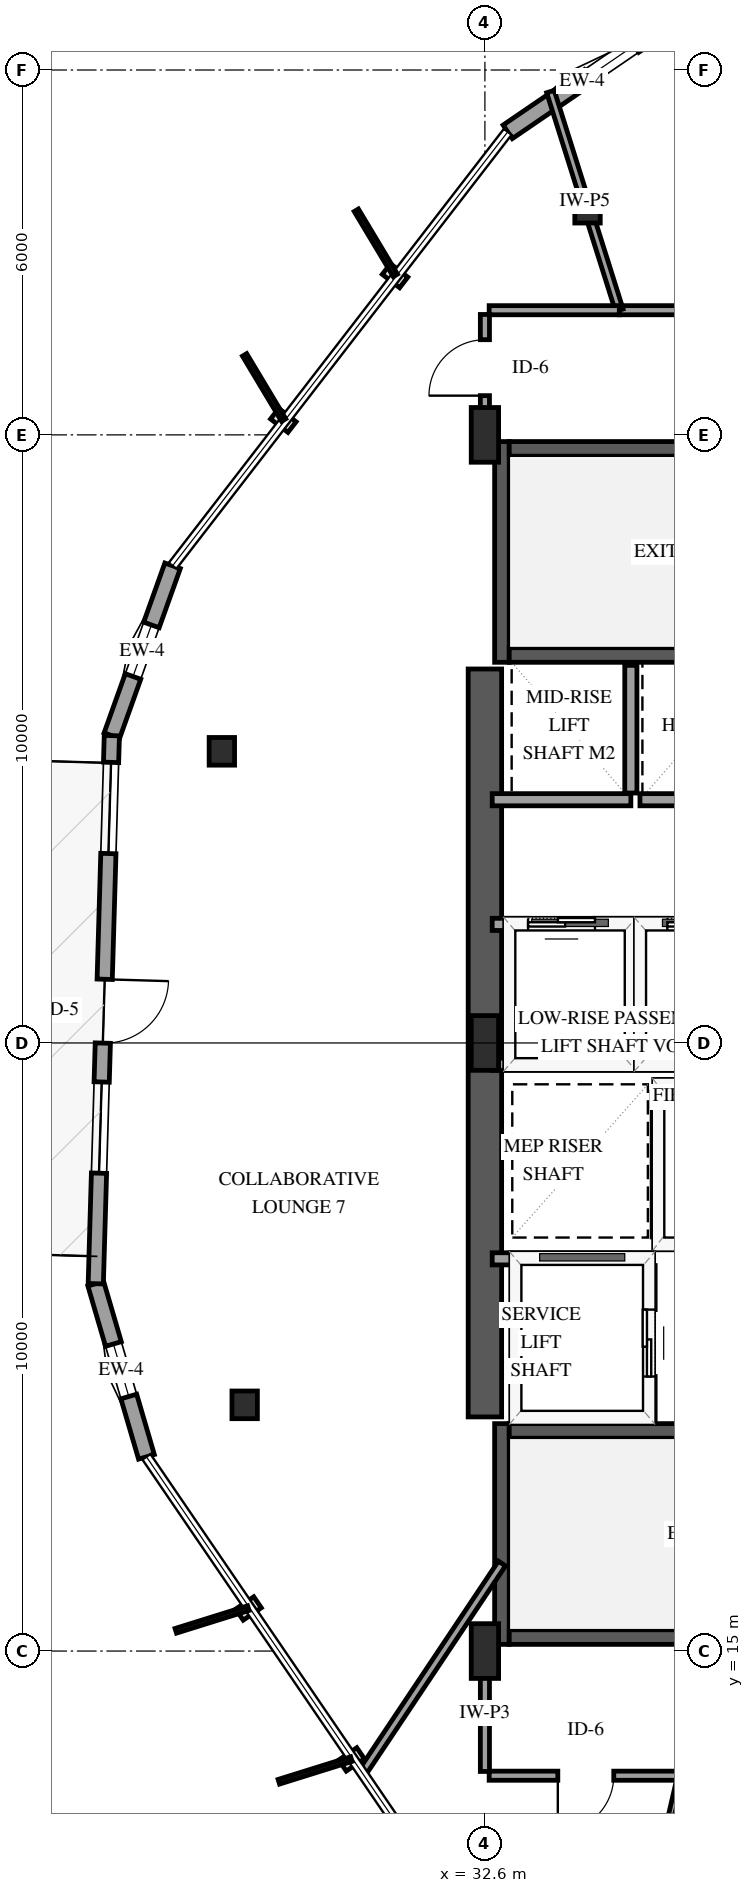
"""IFC4 building model, lengths in metres.
Left out: names, types, materials, properties, quantities, classifications, styles, units other than length and angle.
Written with IfcOpenShell. Run it as: python <this file> out.ifc"""

import sys

from ifc_helpers import new_model, si_unit, direction, frame, frame_2d, origin, origin_2d, place, context, subcontext, project, spatial, rectangle, i_section, extrude, element, fill, save


model = new_model("IFC4")
c1 = context("Model", 3, precision=1e-05, world=origin(), true_north=direction((0.0, 1.0)))
c2 = subcontext(c1, "Body", "Model", "MODEL_VIEW")
j1 = project(units=[si_unit("LENGTHUNIT", "METRE"), si_unit("PLANEANGLEUNIT", "RADIAN")], contexts=[c1])
p1 = place(None, origin())
s1 = spatial("IfcSite", under=j1, at=p1, CompositionType="ELEMENT")
p2 = place(p1, origin())
s2 = spatial("IfcBuilding", under=s1, at=p2, CompositionType="ELEMENT")
p3 = place(p2, frame((0.0, 0.0, 91.3)))
s3 = spatial("IfcBuildingStorey", under=s2, at=p3, CompositionType="ELEMENT", Elevation=91.3)
p4 = place(p3, frame((32.88, 15.11, 0.0), z_axis=(0.0, 0.0, 1.0), x_axis=(0.0, 1.0, 0.0)))
e1 = element("IfcWall", 1, at=p4, inside=s3, PredefinedType="SHEAR", context=c2, shape_type="SweptSolid", body=[
    extrude(rectangle(XDim=3.63, YDim=0.24, at=frame_2d((1.815, 0.0))), origin(), (0.0, 0.0, 1.0), 3.9),
])
for number, where, z_axis, x_axis in (
    (2, (33.0, 15.23, 0.0), (0.0, 0.0, 1.0), (1.0, 0.0, 0.0)),
    (3, (33.0, 18.62, 0.0), (0.0, 0.0, 1.0), (1.0, 0.0, 0.0)),
):
    element("IfcWall", number, at=place(p3, frame(where, z_axis=z_axis, x_axis=x_axis)), inside=s3, PredefinedType="SHEAR", context=c2, shape_type="SweptSolid", body=[
        extrude(rectangle(XDim=8.0, YDim=0.24, at=frame_2d((4.0, 0.0))), origin(), (0.0, 0.0, 1.0), 3.9),
    ])
p5 = place(p3, frame((32.88, 31.26, 0.0), z_axis=(0.0, 0.0, 1.0), x_axis=(0.0, 1.0, 0.0)))
e4 = element("IfcWall", 4, at=p5, inside=s3, PredefinedType="SHEAR", context=c2, shape_type="SweptSolid", body=[
    extrude(rectangle(XDim=3.63, YDim=0.24, at=frame_2d((1.815, 0.0))), origin(), (0.0, 0.0, 1.0), 3.9),
])
for number, where, z_axis, x_axis in (
    (5, (33.0, 31.38, 0.0), (0.0, 0.0, 1.0), (1.0, 0.0, 0.0)),
    (6, (33.0, 34.77, 0.0), (0.0, 0.0, 1.0), (1.0, 0.0, 0.0)),
):
    element("IfcWall", number, at=place(p3, frame(where, z_axis=z_axis, x_axis=x_axis)), inside=s3, PredefinedType="SHEAR", context=c2, shape_type="SweptSolid", body=[
        extrude(rectangle(XDim=8.0, YDim=0.24, at=frame_2d((4.0, 0.0))), origin(), (0.0, 0.0, 1.0), 3.9),
    ])
p6 = place(p3, frame((32.6, 18.85, 0.0), z_axis=(0.0, 0.0, 1.0), x_axis=(0.0, 1.0, 0.0)))
e7 = element("IfcWall", 7, at=p6, inside=s3, PredefinedType="SHEAR", context=c2, shape_type="SweptSolid", body=[
    extrude(rectangle(XDim=12.3, YDim=0.55, at=frame_2d((6.15, 0.0))), origin(), (0.0, 0.0, 1.0), 3.9),
])
for number, where, z_axis, x_axis in (
    (8, (32.6, 15.0, 0.0), (0.0, 0.0, 1.0), (1.0, 0.0, 0.0)),
    (9, (32.6, 25.0, 0.0), (0.0, 0.0, 1.0), (1.0, 0.0, 0.0)),
    (10, (32.6, 35.0, 0.0), (0.0, 0.0, 1.0), (1.0, 0.0, 0.0)),
):
    element("IfcColumn", number, at=place(p3, frame(where, z_axis=z_axis, x_axis=x_axis)), inside=s3, PredefinedType="PILASTER", context=c2, shape_type="SweptSolid", body=[
        extrude(rectangle(XDim=0.45, YDim=0.9, at=origin_2d()), origin(), (0.0, 0.0, 1.0), 3.9),
    ])
for number, where, z_axis, x_axis in (
    (11, (34.288, 38.711, 0.0), (0.0, 0.0, 1.0), (1.0, 0.0, 0.0)),
    (12, (28.274, 29.796, 0.0), (0.0, 0.0, 1.0), (1.0, 0.0, 0.0)),
    (13, (28.649, 19.049, 0.0), (0.0, 0.0, 1.0), (1.0, 0.0, 0.0)),
):
    element("IfcColumn", number, at=place(p3, frame(where, z_axis=z_axis, x_axis=x_axis)), inside=s3, PredefinedType="COLUMN", context=c2, shape_type="SweptSolid", body=[
        extrude(i_section(OverallWidth=0.418, OverallDepth=0.455, WebThickness=0.042, FlangeThickness=0.068, FilletRadius=0.038, at=origin_2d()), origin(), (0.0, 0.0, 1.0), 3.9),
    ])
p7 = place(p3, frame((35.425, 41.656, 0.0), z_axis=(0.0, 0.0, 1.0), x_axis=(-0.825884174717, -0.563839808768, 0.0)))
e14 = element("IfcWall", 14, at=p7, inside=s3, PredefinedType="SOLIDWALL", context=c2, shape_type="SweptSolid", body=[
    extrude(rectangle(XDim=2.967, YDim=0.27, at=frame_2d((1.483, 0.0))), origin(), (0.0, 0.0, 1.0), 2.979),
])
p8 = place(p7, frame((0.45, 0.0, 0.75)))
e15 = element("IfcOpeningElement", 15, at=p8, cuts=e14, PredefinedType="OPENING", context=c2, shape_type="SweptSolid", body=[
    extrude(rectangle(XDim=0.9, YDim=1.5, at=frame_2d((0.45, 0.75))), frame((0.0, 0.145, 0.0), z_axis=(0.0, -1.0, 0.0), x_axis=(1.0, 0.0, 0.0)), (0.0, 0.0, 1.0), 0.29),
])
p9 = place(p3, frame((27.464, 32.847, 0.0), z_axis=(0.0, 0.0, 1.0), x_axis=(-0.336742989922, -0.941596600853, 0.0)))
e16 = element("IfcWall", 16, at=p9, inside=s3, PredefinedType="SOLIDWALL", context=c2, shape_type="SweptSolid", body=[
    extrude(rectangle(XDim=2.967, YDim=0.27, at=frame_2d((1.483, 0.0))), origin(), (0.0, 0.0, 1.0), 2.979),
])
p10 = place(p9, frame((1.033, 0.0, 0.75)))
e17 = element("IfcOpeningElement", 17, at=p10, cuts=e16, PredefinedType="OPENING", context=c2, shape_type="SweptSolid", body=[
    extrude(rectangle(XDim=0.9, YDim=1.5, at=frame_2d((0.45, 0.75))), frame((0.0, 0.145, 0.0), z_axis=(0.0, -1.0, 0.0), x_axis=(1.0, 0.0, 0.0)), (0.0, 0.0, 1.0), 0.29),
])
p11 = place(p3, frame((26.2, 21.041, 0.0), z_axis=(0.0, 0.0, 1.0), x_axis=(0.280976408638, -0.959714675197, 0.0)))
e18 = element("IfcWall", 18, at=p11, inside=s3, PredefinedType="SOLIDWALL", context=c2, shape_type="SweptSolid", body=[
    extrude(rectangle(XDim=2.966, YDim=0.27, at=frame_2d((1.483, 0.0))), origin(), (0.0, 0.0, 1.0), 2.979),
])
p12 = place(p11, frame((1.033, 0.0, 0.75)))
e19 = element("IfcOpeningElement", 19, at=p12, cuts=e18, PredefinedType="OPENING", context=c2, shape_type="SweptSolid", body=[
    extrude(rectangle(XDim=0.9, YDim=1.5, at=frame_2d((0.45, 0.75))), frame((0.0, 0.145, 0.0), z_axis=(0.0, -1.0, 0.0), x_axis=(1.0, 0.0, 0.0)), (0.0, 0.0, 1.0), 0.29),
])
p13 = place(p3, frame((26.465, 30.054, 0.0), z_axis=(0.0, 0.0, 1.0), x_axis=(-0.029323462977, -0.999569974799, 0.0)))
e20 = element("IfcWall", 20, at=p13, inside=s3, PredefinedType="SOLIDWALL", context=c2, shape_type="SweptSolid", body=[
    extrude(rectangle(XDim=9.017, YDim=0.25, at=frame_2d((4.508, 0.0))), origin(), (0.0, 0.0, 1.0), 2.979),
])
p14 = place(p13, frame((4.008, 0.0, 0.0)))
e21 = element("IfcOpeningElement", 21, at=p14, cuts=e20, PredefinedType="OPENING", context=c2, shape_type="SweptSolid", body=[
    extrude(rectangle(XDim=1.05, YDim=2.15, at=frame_2d((0.525, 1.075))), frame((0.0, 0.135, 0.0), z_axis=(0.0, -1.0, 0.0), x_axis=(1.0, 0.0, 0.0)), (0.0, 0.0, 1.0), 0.27),
])
p15 = place(p13, frame((0.44, 0.0, 0.72)))
e22 = element("IfcOpeningElement", 22, at=p15, cuts=e20, PredefinedType="OPENING", context=c2, shape_type="SweptSolid", body=[
    extrude(rectangle(XDim=1.5, YDim=1.7, at=frame_2d((0.75, 0.85))), frame((0.0, 0.135, 0.0), z_axis=(0.0, -1.0, 0.0), x_axis=(1.0, 0.0, 0.0)), (0.0, 0.0, 1.0), 0.27),
])
p16 = place(p13, frame((5.698, 0.0, 0.72)))
e23 = element("IfcOpeningElement", 23, at=p16, cuts=e20, PredefinedType="OPENING", context=c2, shape_type="SweptSolid", body=[
    extrude(rectangle(XDim=1.5, YDim=1.7, at=frame_2d((0.75, 0.85))), frame((0.0, 0.135, 0.0), z_axis=(0.0, -1.0, 0.0), x_axis=(1.0, 0.0, 0.0)), (0.0, 0.0, 1.0), 0.27),
])
p17 = place(p3, frame((35.45, 21.7, 0.0), z_axis=(0.0, 0.0, 1.0), x_axis=(1.0, 0.0, 0.0)))
e24 = element("IfcWall", 24, at=p17, inside=s3, PredefinedType="SOLIDWALL", context=c2, shape_type="SweptSolid", body=[
    extrude(rectangle(XDim=2.0, YDim=0.2, at=frame_2d((1.0, 0.0))), origin(), (0.0, 0.0, 1.0), 3.6),
])
p18 = place(p17, frame((0.45, 0.0, 0.0)))
e25 = element("IfcOpeningElement", 25, at=p18, cuts=e24, PredefinedType="OPENING", context=c2, shape_type="SweptSolid", body=[
    extrude(rectangle(XDim=1.1, YDim=2.15, at=frame_2d((0.55, 1.075))), frame((0.0, 0.11, 0.0), z_axis=(0.0, -1.0, 0.0), x_axis=(1.0, 0.0, 0.0)), (0.0, 0.0, 1.0), 0.22),
])
p19 = place(p3, frame((35.45, 24.3, 0.0), z_axis=(0.0, 0.0, 1.0), x_axis=(1.0, 0.0, 0.0)))
e26 = element("IfcWall", 26, at=p19, inside=s3, PredefinedType="SOLIDWALL", context=c2, shape_type="SweptSolid", body=[
    extrude(rectangle(XDim=2.0, YDim=0.2, at=frame_2d((1.0, 0.0))), origin(), (0.0, 0.0, 1.0), 3.6),
])
p20 = place(p3, frame((35.45, 21.81, 0.0), z_axis=(0.0, 0.0, 1.0), x_axis=(0.0, 1.0, 0.0)))
e27 = element("IfcWall", 27, at=p20, inside=s3, PredefinedType="SOLIDWALL", context=c2, shape_type="SweptSolid", body=[
    extrude(rectangle(XDim=2.38, YDim=0.2, at=frame_2d((1.19, 0.0))), origin(), (0.0, 0.0, 1.0), 3.6),
])
p21 = place(p3, frame((32.72, 21.45, 0.0), z_axis=(0.0, 0.0, 1.0), x_axis=(1.0, 0.0, 0.0)))
e28 = element("IfcWall", 28, at=p21, inside=s3, PredefinedType="SOLIDWALL", context=c2, shape_type="SweptSolid", body=[
    extrude(rectangle(XDim=2.58, YDim=0.2, at=frame_2d((1.29, 0.0))), origin(), (0.0, 0.0, 1.0), 3.6),
])
p22 = place(p3, frame((35.3, 18.79, 0.0), z_axis=(0.0, 0.0, 1.0), x_axis=(0.0, 1.0, 0.0)))
e29 = element("IfcWall", 29, at=p22, inside=s3, PredefinedType="SOLIDWALL", context=c2, shape_type="SweptSolid", body=[
    extrude(rectangle(XDim=2.55, YDim=0.2, at=frame_2d((1.275, 0.0))), origin(), (0.0, 0.0, 1.0), 3.6),
])
p23 = place(p22, frame((0.725, 0.0, 0.0)))
e30 = element("IfcOpeningElement", 30, at=p23, cuts=e29, PredefinedType="OPENING", context=c2, shape_type="SweptSolid", body=[
    extrude(rectangle(XDim=1.1, YDim=2.15, at=frame_2d((0.55, 1.075))), frame((0.0, 0.11, 0.0), z_axis=(0.0, -1.0, 0.0), x_axis=(1.0, 0.0, 0.0)), (0.0, 0.0, 1.0), 0.22),
])
p24 = place(p3, frame((32.72, 24.65, 0.0), z_axis=(0.0, 0.0, 1.0), x_axis=(1.0, 0.0, 0.0)))
e31 = element("IfcWall", 31, at=p24, inside=s3, PredefinedType="SOLIDWALL", context=c2, shape_type="SweptSolid", body=[
    extrude(rectangle(XDim=2.28, YDim=0.2, at=frame_2d((1.14, 0.0))), origin(), (0.0, 0.0, 1.0), 3.6),
])
p25 = place(p3, frame((32.72, 26.95, 0.0), z_axis=(0.0, 0.0, 1.0), x_axis=(1.0, 0.0, 0.0)))
e32 = element("IfcWall", 32, at=p25, inside=s3, PredefinedType="SOLIDWALL", context=c2, shape_type="SweptSolid", body=[
    extrude(rectangle(XDim=2.28, YDim=0.2, at=frame_2d((1.14, 0.0))), origin(), (0.0, 0.0, 1.0), 3.6),
])
p26 = place(p25, frame((0.59, 0.0, 0.0)))
e33 = element("IfcOpeningElement", 33, at=p26, cuts=e32, PredefinedType="OPENING", context=c2, shape_type="SweptSolid", body=[
    extrude(rectangle(XDim=1.1, YDim=2.15, at=frame_2d((0.55, 1.075))), frame((0.0, 0.11, 0.0), z_axis=(0.0, -1.0, 0.0), x_axis=(1.0, 0.0, 0.0)), (0.0, 0.0, 1.0), 0.22),
])
p27 = place(p3, frame((35.0, 24.76, 0.0), z_axis=(0.0, 0.0, 1.0), x_axis=(0.0, 1.0, 0.0)))
e34 = element("IfcWall", 34, at=p27, inside=s3, PredefinedType="SOLIDWALL", context=c2, shape_type="SweptSolid", body=[
    extrude(rectangle(XDim=2.08, YDim=0.2, at=frame_2d((1.04, 0.0))), origin(), (0.0, 0.0, 1.0), 3.6),
])
p28 = place(p3, frame((35.15, 24.65, 0.0), z_axis=(0.0, 0.0, 1.0), x_axis=(1.0, 0.0, 0.0)))
e35 = element("IfcWall", 35, at=p28, inside=s3, PredefinedType="SOLIDWALL", context=c2, shape_type="SweptSolid", body=[
    extrude(rectangle(XDim=2.0, YDim=0.2, at=frame_2d((1.0, 0.0))), origin(), (0.0, 0.0, 1.0), 3.6),
])
p29 = place(p3, frame((35.15, 26.95, 0.0), z_axis=(0.0, 0.0, 1.0), x_axis=(1.0, 0.0, 0.0)))
e36 = element("IfcWall", 36, at=p29, inside=s3, PredefinedType="SOLIDWALL", context=c2, shape_type="SweptSolid", body=[
    extrude(rectangle(XDim=2.0, YDim=0.2, at=frame_2d((1.0, 0.0))), origin(), (0.0, 0.0, 1.0), 3.6),
])
p30 = place(p29, frame((0.45, 0.0, 0.0)))
e37 = element("IfcOpeningElement", 37, at=p30, cuts=e36, PredefinedType="OPENING", context=c2, shape_type="SweptSolid", body=[
    extrude(rectangle(XDim=1.1, YDim=2.15, at=frame_2d((0.55, 1.075))), frame((0.0, 0.11, 0.0), z_axis=(0.0, -1.0, 0.0), x_axis=(1.0, 0.0, 0.0)), (0.0, 0.0, 1.0), 0.22),
])
p31 = place(p3, frame((32.72, 29.0, 0.0), z_axis=(0.0, 0.0, 1.0), x_axis=(1.0, 0.0, 0.0)))
e38 = element("IfcWall", 38, at=p31, inside=s3, PredefinedType="SOLIDWALL", context=c2, shape_type="SweptSolid", body=[
    extrude(rectangle(XDim=2.28, YDim=0.2, at=frame_2d((1.14, 0.0))), origin(), (0.0, 0.0, 1.0), 3.6),
])
p32 = place(p3, frame((35.0, 29.11, 0.0), z_axis=(0.0, 0.0, 1.0), x_axis=(0.0, 1.0, 0.0)))
e39 = element("IfcWall", 39, at=p32, inside=s3, PredefinedType="SOLIDWALL", context=c2, shape_type="SweptSolid", body=[
    extrude(rectangle(XDim=2.1, YDim=0.2, at=frame_2d((1.05, 0.0))), origin(), (0.0, 0.0, 1.0), 3.6),
])
p33 = place(p3, frame((35.15, 29.0, 0.0), z_axis=(0.0, 0.0, 1.0), x_axis=(1.0, 0.0, 0.0)))
e40 = element("IfcWall", 40, at=p33, inside=s3, PredefinedType="SOLIDWALL", context=c2, shape_type="SweptSolid", body=[
    extrude(rectangle(XDim=2.0, YDim=0.2, at=frame_2d((1.0, 0.0))), origin(), (0.0, 0.0, 1.0), 3.6),
])
p34 = place(p3, frame((34.81, 37.05, 0.0), z_axis=(0.0, 0.0, 1.0), x_axis=(1.0, 0.0, 0.0)))
e41 = element("IfcWall", 41, at=p34, inside=s3, PredefinedType="PARTITIONING", context=c2, shape_type="SweptSolid", body=[
    extrude(rectangle(XDim=7.804, YDim=0.15, at=frame_2d((3.902, 0.0))), origin(), (0.0, 0.0, 1.0), 3.6),
])
p35 = place(p34, frame((3.427, 0.0, 0.0)))
e42 = element("IfcOpeningElement", 42, at=p35, cuts=e41, PredefinedType="OPENING", context=c2, shape_type="SweptSolid", body=[
    extrude(rectangle(XDim=0.92, YDim=2.12, at=frame_2d((0.46, 1.06))), frame((0.0, 0.085, 0.0), z_axis=(0.0, -1.0, 0.0), x_axis=(1.0, 0.0, 0.0)), (0.0, 0.0, 1.0), 0.17),
])
p36 = place(p3, frame((35.819, 12.95, 0.0), z_axis=(0.0, 0.0, 1.0), x_axis=(-0.225277389067, -0.974294666913, 0.0)))
e43 = element("IfcWall", 43, at=p36, inside=s3, PredefinedType="PARTITIONING", context=c2, shape_type="SweptSolid", body=[
    extrude(rectangle(XDim=4.267, YDim=0.1, at=frame_2d((2.133, 0.0))), origin(), (0.0, 0.0, 1.0), 2.895),
])
p37 = place(p3, frame((32.88, 16.44, 0.0), z_axis=(0.0, 0.0, 1.0), x_axis=(-0.555516811992, -0.83150530461, 0.0)))
e44 = element("IfcWall", 44, at=p37, inside=s3, PredefinedType="PARTITIONING", context=c2, shape_type="SweptSolid", body=[
    extrude(rectangle(XDim=4.138, YDim=0.14, at=frame_2d((2.069, 0.0))), origin(), (0.0, 0.0, 1.0), 3.6),
])
p38 = place(p3, frame((34.81, 37.05, 0.0), z_axis=(0.0, 0.0, 1.0), x_axis=(-0.300291330814, 0.953847533224, 0.0)))
e45 = element("IfcWall", 45, at=p38, inside=s3, PredefinedType="PARTITIONING", context=c2, shape_type="SweptSolid", body=[
    extrude(rectangle(XDim=3.77, YDim=0.13, at=frame_2d((1.885, 0.0))), origin(), (0.0, 0.0, 1.0), 2.895),
])
p39 = place(p3, frame((35.819, 12.95, 0.0), z_axis=(0.0, 0.0, 1.0), x_axis=(-1.0, 0.0, 0.0)))
e46 = element("IfcWall", 46, at=p39, inside=s3, PredefinedType="PARTITIONING", context=c2, shape_type="SweptSolid", body=[
    extrude(rectangle(XDim=3.149, YDim=0.15, at=frame_2d((1.575, 0.0))), origin(), (0.0, 0.0, 1.0), 3.6),
])
p40 = place(p39, frame((1.1, 0.0, 0.0)))
e47 = element("IfcOpeningElement", 47, at=p40, cuts=e46, PredefinedType="OPENING", context=c2, shape_type="SweptSolid", body=[
    extrude(rectangle(XDim=0.92, YDim=2.12, at=frame_2d((0.46, 1.06))), frame((0.0, 0.085, 0.0), z_axis=(0.0, -1.0, 0.0), x_axis=(1.0, 0.0, 0.0)), (0.0, 0.0, 1.0), 0.17),
])
p41 = place(p3, frame((32.67, 37.05, 0.0), z_axis=(0.0, 0.0, 1.0), x_axis=(1.0, 0.0, 0.0)))
e48 = element("IfcWall", 48, at=p41, inside=s3, PredefinedType="PARTITIONING", context=c2, shape_type="SweptSolid", body=[
    extrude(rectangle(XDim=2.14, YDim=0.15, at=frame_2d((1.07, 0.0))), origin(), (0.0, 0.0, 1.0), 3.6),
])
p42 = place(p3, frame((32.6, 13.02, 0.0), z_axis=(0.0, 0.0, 1.0), x_axis=(0.0, 1.0, 0.0)))
e49 = element("IfcWall", 49, at=p42, inside=s3, PredefinedType="PARTITIONING", context=c2, shape_type="SweptSolid", body=[
    extrude(rectangle(XDim=1.91, YDim=0.15, at=frame_2d((0.955, 0.0))), origin(), (0.0, 0.0, 1.0), 3.6),
])
p43 = place(p3, frame((32.6, 35.07, 0.0), z_axis=(0.0, 0.0, 1.0), x_axis=(0.0, 1.0, 0.0)))
e50 = element("IfcWall", 50, at=p43, inside=s3, PredefinedType="PARTITIONING", context=c2, shape_type="SweptSolid", body=[
    extrude(rectangle(XDim=1.91, YDim=0.15, at=frame_2d((0.955, 0.0))), origin(), (0.0, 0.0, 1.0), 3.6),
])
p44 = place(p43, frame((0.575, 0.0, 0.0)))
e51 = element("IfcOpeningElement", 51, at=p44, cuts=e50, PredefinedType="OPENING", context=c2, shape_type="SweptSolid", body=[
    extrude(rectangle(XDim=0.92, YDim=2.12, at=frame_2d((0.46, 1.06))), frame((0.0, 0.085, 0.0), z_axis=(0.0, -1.0, 0.0), x_axis=(1.0, 0.0, 0.0)), (0.0, 0.0, 1.0), 0.17),
])
p45 = place(p8, origin())
e52 = element("IfcWindow", 52, at=p45, inside=s3, PartitioningType="SINGLE_PANEL", PredefinedType="WINDOW", context=c2, shape_type="SweptSolid", body=[
    extrude(rectangle(XDim=0.9, YDim=1.5, at=frame_2d((0.45, 0.75))), frame((0.0, 0.03, 0.0), z_axis=(0.0, -1.0, 0.0), x_axis=(1.0, 0.0, 0.0)), (0.0, 0.0, 1.0), 0.06),
])
fill(e15, e52)
p46 = place(p10, origin())
e53 = element("IfcWindow", 53, at=p46, inside=s3, PartitioningType="SINGLE_PANEL", PredefinedType="WINDOW", context=c2, shape_type="SweptSolid", body=[
    extrude(rectangle(XDim=0.9, YDim=1.5, at=frame_2d((0.45, 0.75))), frame((0.0, 0.03, 0.0), z_axis=(0.0, -1.0, 0.0), x_axis=(1.0, 0.0, 0.0)), (0.0, 0.0, 1.0), 0.06),
])
fill(e17, e53)
p47 = place(p12, origin())
e54 = element("IfcWindow", 54, at=p47, inside=s3, PartitioningType="SINGLE_PANEL", PredefinedType="WINDOW", context=c2, shape_type="SweptSolid", body=[
    extrude(rectangle(XDim=0.9, YDim=1.5, at=frame_2d((0.45, 0.75))), frame((0.0, 0.03, 0.0), z_axis=(0.0, -1.0, 0.0), x_axis=(1.0, 0.0, 0.0)), (0.0, 0.0, 1.0), 0.06),
])
fill(e19, e54)
p48 = place(p14, origin())
e55 = element("IfcDoor", 55, at=p48, inside=s3, OperationType="SINGLE_SWING_LEFT", PredefinedType="DOOR", context=c2, shape_type="SweptSolid", body=[
    extrude(rectangle(XDim=1.05, YDim=2.15, at=frame_2d((0.525, 1.075))), frame((0.0, 0.025, 0.0), z_axis=(0.0, -1.0, 0.0), x_axis=(1.0, 0.0, 0.0)), (0.0, 0.0, 1.0), 0.05),
])
fill(e21, e55)
p49 = place(p15, origin())
e56 = element("IfcWindow", 56, at=p49, inside=s3, PartitioningType="SINGLE_PANEL", PredefinedType="WINDOW", context=c2, shape_type="SweptSolid", body=[
    extrude(rectangle(XDim=1.5, YDim=1.7, at=frame_2d((0.75, 0.85))), frame((0.0, 0.03, 0.0), z_axis=(0.0, -1.0, 0.0), x_axis=(1.0, 0.0, 0.0)), (0.0, 0.0, 1.0), 0.06),
])
fill(e22, e56)
p50 = place(p16, origin())
e57 = element("IfcWindow", 57, at=p50, inside=s3, PartitioningType="SINGLE_PANEL", PredefinedType="WINDOW", context=c2, shape_type="SweptSolid", body=[
    extrude(rectangle(XDim=1.5, YDim=1.7, at=frame_2d((0.75, 0.85))), frame((0.0, 0.03, 0.0), z_axis=(0.0, -1.0, 0.0), x_axis=(1.0, 0.0, 0.0)), (0.0, 0.0, 1.0), 0.06),
])
fill(e23, e57)
p51 = place(p23, origin())
e58 = element("IfcDoor", 58, at=p51, inside=s3, OperationType="SLIDING_TO_LEFT", PredefinedType="DOOR", context=c2, shape_type="SweptSolid", body=[
    extrude(rectangle(XDim=1.1, YDim=2.15, at=frame_2d((0.55, 1.075))), frame((0.0, 0.025, 0.0), z_axis=(0.0, -1.0, 0.0), x_axis=(1.0, 0.0, 0.0)), (0.0, 0.0, 1.0), 0.05),
])
fill(e30, e58)
p52 = place(p26, origin())
e59 = element("IfcDoor", 59, at=p52, inside=s3, OperationType="SLIDING_TO_LEFT", PredefinedType="DOOR", context=c2, shape_type="SweptSolid", body=[
    extrude(rectangle(XDim=1.1, YDim=2.15, at=frame_2d((0.55, 1.075))), frame((0.0, 0.025, 0.0), z_axis=(0.0, -1.0, 0.0), x_axis=(1.0, 0.0, 0.0)), (0.0, 0.0, 1.0), 0.05),
])
fill(e33, e59)
p53 = place(p30, origin())
e60 = element("IfcDoor", 60, at=p53, inside=s3, OperationType="SLIDING_TO_LEFT", PredefinedType="DOOR", context=c2, shape_type="SweptSolid", body=[
    extrude(rectangle(XDim=1.1, YDim=2.15, at=frame_2d((0.55, 1.075))), frame((0.0, 0.025, 0.0), z_axis=(0.0, -1.0, 0.0), x_axis=(1.0, 0.0, 0.0)), (0.0, 0.0, 1.0), 0.05),
])
fill(e37, e60)
p54 = place(p40, origin())
e61 = element("IfcDoor", 61, at=p54, inside=s3, OperationType="SINGLE_SWING_RIGHT", PredefinedType="DOOR", context=c2, shape_type="SweptSolid", body=[
    extrude(rectangle(XDim=0.92, YDim=2.12, at=frame_2d((0.46, 1.06))), frame((0.0, 0.025, 0.0), z_axis=(0.0, -1.0, 0.0), x_axis=(1.0, 0.0, 0.0)), (0.0, 0.0, 1.0), 0.05),
])
fill(e47, e61)
p55 = place(p44, origin())
e62 = element("IfcDoor", 62, at=p55, inside=s3, OperationType="SINGLE_SWING_LEFT", PredefinedType="DOOR", context=c2, shape_type="SweptSolid", body=[
    extrude(rectangle(XDim=0.92, YDim=2.12, at=frame_2d((0.46, 1.06))), frame((0.0, 0.025, 0.0), z_axis=(0.0, -1.0, 0.0), x_axis=(1.0, 0.0, 0.0)), (0.0, 0.0, 1.0), 0.05),
])
fill(e51, e62)
save(model, sys.argv[1])
